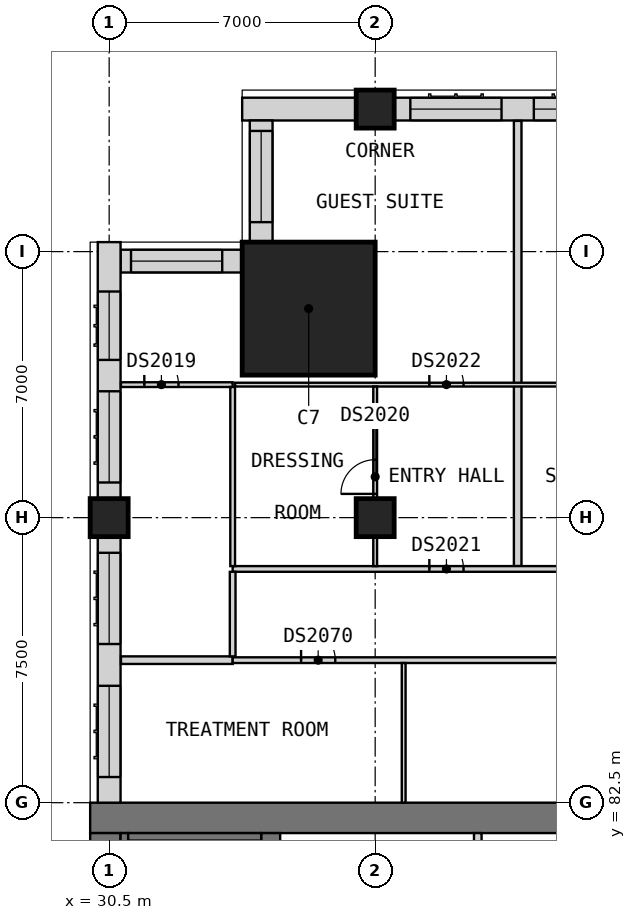
"""IFC4 building model, lengths in metres.
Left out: names, types, materials, properties, quantities, classifications, styles, units other than length and angle.
Written with IfcOpenShell. Run it as: python <this file> out.ifc"""

import sys

from ifc_helpers import new_model, si_unit, direction, frame, frame_2d, origin, origin_2d, place, context, subcontext, project, spatial, rectangle, extrude, element, fill, save


model = new_model("IFC4")
c1 = context("Model", 3, precision=1e-05, world=origin(), true_north=direction((0.0, 1.0)))
c2 = subcontext(c1, "Body", "Model", "MODEL_VIEW")
j1 = project(units=[si_unit("LENGTHUNIT", "METRE"), si_unit("PLANEANGLEUNIT", "RADIAN")], contexts=[c1])
p1 = place(None, origin())
s1 = spatial("IfcSite", under=j1, at=p1, CompositionType="ELEMENT")
p2 = place(p1, origin())
s2 = spatial("IfcBuilding", under=s1, at=p2, CompositionType="ELEMENT")
p3 = place(p2, frame((0.0, 0.0, 162.6)))
s3 = spatial("IfcBuildingStorey", under=s2, at=p3, CompositionType="ELEMENT", Elevation=162.6)
for number, where, z_axis, x_axis in (
    (1, (37.5, 100.75, 0.0), (0.0, 0.0, 1.0), (1.0, 0.0, 0.0)),
    (2, (30.5, 90.0, 0.0), (0.0, 0.0, 1.0), (1.0, 0.0, 0.0)),
    (3, (37.5, 90.0, 0.0), (0.0, 0.0, 1.0), (1.0, 0.0, 0.0)),
):
    element("IfcColumn", number, at=place(p3, frame(where, z_axis=z_axis, x_axis=x_axis)), inside=s3, PredefinedType="COLUMN", context=c2, shape_type="SweptSolid", body=[
        extrude(rectangle(XDim=1.0, YDim=1.0, at=origin_2d()), origin(), (0.0, 0.0, 1.0), 3.6),
    ])
p4 = place(p3, frame((35.75, 95.5, 0.0), z_axis=(0.0, 0.0, 1.0), x_axis=(1.0, 0.0, 0.0)))
e4 = element("IfcColumn", 4, at=p4, inside=s3, PredefinedType="COLUMN", context=c2, shape_type="SweptSolid", body=[
    extrude(rectangle(XDim=3.5, YDim=3.5, at=origin_2d()), origin(), (0.0, 0.0, 1.0), 3.6),
])
p5 = place(p3, frame((30.0, 82.1, 0.0), z_axis=(0.0, 0.0, 1.0), x_axis=(1.0, 0.0, 0.0)))
e5 = element("IfcWall", 5, at=p5, inside=s3, PredefinedType="SHEAR", context=c2, shape_type="SweptSolid", body=[
    extrude(rectangle(XDim=30.0, YDim=0.8, at=frame_2d((15.0, 0.0))), origin(), (0.0, 0.0, 1.0), 3.6),
])
p6 = place(p3, frame((30.4, 60.8, 0.0), z_axis=(0.0, 0.0, 1.0), x_axis=(0.0, 1.0, 0.0)))
e6 = element("IfcWall", 6, at=p6, inside=s3, PredefinedType="SHEAR", context=c2, shape_type="SweptSolid", body=[
    extrude(rectangle(XDim=20.9, YDim=0.8, at=frame_2d((10.45, 0.0))), origin(), (0.0, 0.0, 1.0), 3.6),
])
p7 = place(p3, frame((34.75, 78.3, 0.0), z_axis=(0.0, 0.0, 1.0), x_axis=(0.0, 1.0, 0.0)))
e7 = element("IfcWall", 7, at=p7, inside=s3, PredefinedType="SHEAR", context=c2, shape_type="SweptSolid", body=[
    extrude(rectangle(XDim=3.4, YDim=0.5, at=frame_2d((1.7, 0.0))), origin(), (0.0, 0.0, 1.0), 3.6),
])
p8 = place(p3, frame((44.5, 100.75, 0.0), z_axis=(0.0, 0.0, 1.0), x_axis=(-1.0, 0.0, 0.0)))
e8 = element("IfcWall", 8, at=p8, inside=s3, PredefinedType="SOLIDWALL", context=c2, shape_type="SweptSolid", body=[
    extrude(rectangle(XDim=6.5, YDim=0.6, at=frame_2d((3.25, 0.0))), origin(), (0.0, 0.0, 1.0), 2.85),
])
p9 = place(p8, frame((3.675, 0.0, 0.8)))
e9 = element("IfcOpeningElement", 9, at=p9, cuts=e8, PredefinedType="OPENING", context=c2, shape_type="SweptSolid", body=[
    extrude(rectangle(XDim=2.4, YDim=1.8, at=frame_2d((1.2, 0.9))), frame((0.0, 0.31, 0.0), z_axis=(0.0, -1.0, 0.0), x_axis=(1.0, 0.0, 0.0)), (0.0, 0.0, 1.0), 0.62),
])
p10 = place(p8, frame((0.425, 0.0, 0.8)))
e10 = element("IfcOpeningElement", 10, at=p10, cuts=e8, PredefinedType="OPENING", context=c2, shape_type="SweptSolid", body=[
    extrude(rectangle(XDim=2.4, YDim=1.8, at=frame_2d((1.2, 0.9))), frame((0.0, 0.31, 0.0), z_axis=(0.0, -1.0, 0.0), x_axis=(1.0, 0.0, 0.0)), (0.0, 0.0, 1.0), 0.62),
])
p11 = place(p3, frame((37.0, 100.75, 0.0), z_axis=(0.0, 0.0, 1.0), x_axis=(-1.0, 0.0, 0.0)))
e11 = element("IfcWall", 11, at=p11, inside=s3, PredefinedType="SOLIDWALL", context=c2, shape_type="SweptSolid", body=[
    extrude(rectangle(XDim=3.0, YDim=0.6, at=frame_2d((1.5, 0.0))), origin(), (0.0, 0.0, 1.0), 3.2),
])
p12 = place(p3, frame((34.5, 100.45, 0.0), z_axis=(0.0, 0.0, 1.0), x_axis=(0.0, -1.0, 0.0)))
e12 = element("IfcWall", 12, at=p12, inside=s3, PredefinedType="SOLIDWALL", context=c2, shape_type="SweptSolid", body=[
    extrude(rectangle(XDim=3.2, YDim=0.6, at=frame_2d((1.6, 0.0))), origin(), (0.0, 0.0, 1.0), 3.2),
])
p13 = place(p12, frame((0.275, 0.0, 0.8)))
e13 = element("IfcOpeningElement", 13, at=p13, cuts=e12, PredefinedType="OPENING", context=c2, shape_type="SweptSolid", body=[
    extrude(rectangle(XDim=2.4, YDim=1.8, at=frame_2d((1.2, 0.9))), frame((0.0, 0.31, 0.0), z_axis=(0.0, -1.0, 0.0), x_axis=(1.0, 0.0, 0.0)), (0.0, 0.0, 1.0), 0.62),
])
p14 = place(p3, frame((34.0, 96.75, 0.0), z_axis=(0.0, 0.0, 1.0), x_axis=(-1.0, 0.0, 0.0)))
e14 = element("IfcWall", 14, at=p14, inside=s3, PredefinedType="SOLIDWALL", context=c2, shape_type="SweptSolid", body=[
    extrude(rectangle(XDim=3.2, YDim=0.6, at=frame_2d((1.6, 0.0))), origin(), (0.0, 0.0, 1.0), 3.2),
])
p15 = place(p14, frame((0.525, 0.0, 0.8)))
e15 = element("IfcOpeningElement", 15, at=p15, cuts=e14, PredefinedType="OPENING", context=c2, shape_type="SweptSolid", body=[
    extrude(rectangle(XDim=2.4, YDim=1.8, at=frame_2d((1.2, 0.9))), frame((0.0, 0.31, 0.0), z_axis=(0.0, -1.0, 0.0), x_axis=(1.0, 0.0, 0.0)), (0.0, 0.0, 1.0), 0.62),
])
p16 = place(p3, frame((30.5, 97.25, 0.0), z_axis=(0.0, 0.0, 1.0), x_axis=(0.0, -1.0, 0.0)))
e16 = element("IfcWall", 16, at=p16, inside=s3, PredefinedType="SOLIDWALL", context=c2, shape_type="SweptSolid", body=[
    extrude(rectangle(XDim=6.75, YDim=0.6, at=frame_2d((3.375, 0.0))), origin(), (0.0, 0.0, 1.0), 2.85),
])
p17 = place(p16, frame((3.925, 0.0, 0.8)))
e17 = element("IfcOpeningElement", 17, at=p17, cuts=e16, PredefinedType="OPENING", context=c2, shape_type="SweptSolid", body=[
    extrude(rectangle(XDim=2.4, YDim=1.8, at=frame_2d((1.2, 0.9))), frame((0.0, 0.31, 0.0), z_axis=(0.0, -1.0, 0.0), x_axis=(1.0, 0.0, 0.0)), (0.0, 0.0, 1.0), 0.62),
])
p18 = place(p16, frame((1.3, 0.0, 0.8)))
e18 = element("IfcOpeningElement", 18, at=p18, cuts=e16, PredefinedType="OPENING", context=c2, shape_type="SweptSolid", body=[
    extrude(rectangle(XDim=1.8, YDim=1.8, at=frame_2d((0.9, 0.9))), frame((0.0, 0.31, 0.0), z_axis=(0.0, -1.0, 0.0), x_axis=(1.0, 0.0, 0.0)), (0.0, 0.0, 1.0), 0.62),
])
p19 = place(p3, frame((30.5, 89.5, 0.0), z_axis=(0.0, 0.0, 1.0), x_axis=(0.0, -1.0, 0.0)))
e19 = element("IfcWall", 19, at=p19, inside=s3, PredefinedType="SOLIDWALL", context=c2, shape_type="SweptSolid", body=[
    extrude(rectangle(XDim=7.0, YDim=0.6, at=frame_2d((3.5, 0.0))), origin(), (0.0, 0.0, 1.0), 3.2),
])
p20 = place(p19, frame((3.925, 0.0, 0.8)))
e20 = element("IfcOpeningElement", 20, at=p20, cuts=e19, PredefinedType="OPENING", context=c2, shape_type="SweptSolid", body=[
    extrude(rectangle(XDim=2.4, YDim=1.8, at=frame_2d((1.2, 0.9))), frame((0.0, 0.31, 0.0), z_axis=(0.0, -1.0, 0.0), x_axis=(1.0, 0.0, 0.0)), (0.0, 0.0, 1.0), 0.62),
])
p21 = place(p19, frame((0.425, 0.0, 0.8)))
e21 = element("IfcOpeningElement", 21, at=p21, cuts=e19, PredefinedType="OPENING", context=c2, shape_type="SweptSolid", body=[
    extrude(rectangle(XDim=2.4, YDim=1.8, at=frame_2d((1.2, 0.9))), frame((0.0, 0.31, 0.0), z_axis=(0.0, -1.0, 0.0), x_axis=(1.0, 0.0, 0.0)), (0.0, 0.0, 1.0), 0.62),
])
p22 = place(p3, frame((40.2, 78.5, 0.0), z_axis=(0.0, 0.0, 1.0), x_axis=(0.0, 1.0, 0.0)))
e22 = element("IfcWall", 22, at=p22, inside=s3, PredefinedType="SOLIDWALL", context=c2, shape_type="SweptSolid", body=[
    extrude(rectangle(XDim=3.2, YDim=0.2, at=frame_2d((1.6, 0.0))), origin(), (0.0, 0.0, 1.0), 3.6),
])
p23 = place(p3, frame((30.9, 60.8, 0.0), z_axis=(0.0, 0.0, 1.0), x_axis=(0.0, 1.0, 0.0)))
e23 = element("IfcWall", 23, at=p23, inside=s3, PredefinedType="SOLIDWALL", context=c2, shape_type="SweptSolid", body=[
    extrude(rectangle(XDim=20.9, YDim=0.2, at=frame_2d((10.45, 0.0))), origin(), (0.0, 0.0, 1.0), 3.19),
])
p24 = place(p3, frame((31.0, 81.6, 0.0), z_axis=(0.0, 0.0, 1.0), x_axis=(1.0, 0.0, 0.0)))
e24 = element("IfcWall", 24, at=p24, inside=s3, PredefinedType="SOLIDWALL", context=c2, shape_type="SweptSolid", body=[
    extrude(rectangle(XDim=3.5, YDim=0.2, at=frame_2d((1.75, 0.0))), origin(), (0.0, 0.0, 1.0), 3.19),
])
p25 = place(p3, frame((30.81, 86.25, 0.0), z_axis=(0.0, 0.0, 1.0), x_axis=(1.0, 0.0, 0.0)))
e25 = element("IfcWall", 25, at=p25, inside=s3, PredefinedType="PARTITIONING", context=c2, shape_type="SweptSolid", body=[
    extrude(rectangle(XDim=2.94, YDim=0.2, at=frame_2d((1.47, 0.0))), origin(), (0.0, 0.0, 1.0), 3.2),
])
p26 = place(p3, frame((41.25, 88.725, 0.0), z_axis=(0.0, 0.0, 1.0), x_axis=(0.0, 1.0, 0.0)))
e26 = element("IfcWall", 26, at=p26, inside=s3, PredefinedType="PARTITIONING", context=c2, shape_type="SweptSolid", body=[
    extrude(rectangle(XDim=11.715, YDim=0.2, at=frame_2d((5.857, 0.0))), origin(), (0.0, 0.0, 1.0), 3.2),
])
p27 = place(p3, frame((33.75, 86.25, 0.0), z_axis=(0.0, 0.0, 1.0), x_axis=(1.0, 0.0, 0.0)))
e27 = element("IfcWall", 27, at=p27, inside=s3, PredefinedType="PARTITIONING", context=c2, shape_type="SweptSolid", body=[
    extrude(rectangle(XDim=37.5, YDim=0.15, at=frame_2d((18.75, 0.0))), origin(), (0.0, 0.0, 1.0), 3.2),
])
p28 = place(p27, frame((1.8, 0.0, 0.0)))
e28 = element("IfcOpeningElement", 28, at=p28, cuts=e27, PredefinedType="OPENING", context=c2, shape_type="SweptSolid", body=[
    extrude(rectangle(XDim=0.9, YDim=2.1, at=frame_2d((0.45, 1.05))), frame((0.0, 0.085, 0.0), z_axis=(0.0, -1.0, 0.0), x_axis=(1.0, 0.0, 0.0)), (0.0, 0.0, 1.0), 0.17),
])
p29 = place(p3, frame((33.75, 88.65, 0.0), z_axis=(0.0, 0.0, 1.0), x_axis=(1.0, 0.0, 0.0)))
e29 = element("IfcWall", 29, at=p29, inside=s3, PredefinedType="PARTITIONING", context=c2, shape_type="SweptSolid", body=[
    extrude(rectangle(XDim=39.9, YDim=0.15, at=frame_2d((19.95, 0.0))), origin(), (0.0, 0.0, 1.0), 3.2),
])
p30 = place(p29, frame((5.175, 0.0, 0.0)))
e30 = element("IfcOpeningElement", 30, at=p30, cuts=e29, PredefinedType="OPENING", context=c2, shape_type="SweptSolid", body=[
    extrude(rectangle(XDim=0.9, YDim=2.1, at=frame_2d((0.45, 1.05))), frame((0.0, 0.085, 0.0), z_axis=(0.0, -1.0, 0.0), x_axis=(1.0, 0.0, 0.0)), (0.0, 0.0, 1.0), 0.17),
])
p31 = place(p29, frame((9.3, 0.0, 0.0)))
e31 = element("IfcOpeningElement", 31, at=p31, cuts=e29, PredefinedType="OPENING", context=c2, shape_type="SweptSolid", body=[
    extrude(rectangle(XDim=0.9, YDim=2.1, at=frame_2d((0.45, 1.05))), frame((0.0, 0.085, 0.0), z_axis=(0.0, -1.0, 0.0), x_axis=(1.0, 0.0, 0.0)), (0.0, 0.0, 1.0), 0.17),
])
p32 = place(p29, frame((21.113, 0.0, 0.0)))
e32 = element("IfcOpeningElement", 32, at=p32, cuts=e29, PredefinedType="OPENING", context=c2, shape_type="SweptSolid", body=[
    extrude(rectangle(XDim=0.9, YDim=2.1, at=frame_2d((0.45, 1.05))), frame((0.0, 0.085, 0.0), z_axis=(0.0, -1.0, 0.0), x_axis=(1.0, 0.0, 0.0)), (0.0, 0.0, 1.0), 0.17),
])
p33 = place(p29, frame((28.05, 0.0, 0.0)))
e33 = element("IfcOpeningElement", 33, at=p33, cuts=e29, PredefinedType="OPENING", context=c2, shape_type="SweptSolid", body=[
    extrude(rectangle(XDim=0.9, YDim=2.1, at=frame_2d((0.45, 1.05))), frame((0.0, 0.085, 0.0), z_axis=(0.0, -1.0, 0.0), x_axis=(1.0, 0.0, 0.0)), (0.0, 0.0, 1.0), 0.17),
])
p34 = place(p29, frame((35.55, 0.0, 0.0)))
e34 = element("IfcOpeningElement", 34, at=p34, cuts=e29, PredefinedType="OPENING", context=c2, shape_type="SweptSolid", body=[
    extrude(rectangle(XDim=0.9, YDim=2.1, at=frame_2d((0.45, 1.05))), frame((0.0, 0.085, 0.0), z_axis=(0.0, -1.0, 0.0), x_axis=(1.0, 0.0, 0.0)), (0.0, 0.0, 1.0), 0.17),
])
p35 = place(p29, frame((38.25, 0.0, 0.0)))
e35 = element("IfcOpeningElement", 35, at=p35, cuts=e29, PredefinedType="OPENING", context=c2, shape_type="SweptSolid", body=[
    extrude(rectangle(XDim=0.9, YDim=2.1, at=frame_2d((0.45, 1.05))), frame((0.0, 0.085, 0.0), z_axis=(0.0, -1.0, 0.0), x_axis=(1.0, 0.0, 0.0)), (0.0, 0.0, 1.0), 0.17),
])
p36 = place(p3, frame((33.75, 86.35, 0.0), z_axis=(0.0, 0.0, 1.0), x_axis=(0.0, 1.0, 0.0)))
e36 = element("IfcWall", 36, at=p36, inside=s3, PredefinedType="PARTITIONING", context=c2, shape_type="SweptSolid", body=[
    extrude(rectangle(XDim=2.225, YDim=0.15, at=frame_2d((1.112, 0.0))), origin(), (0.0, 0.0, 1.0), 3.2),
])
p37 = place(p3, frame((33.812, 93.5, 0.0), z_axis=(0.0, 0.0, 1.0), x_axis=(1.0, 0.0, 0.0)))
e37 = element("IfcWall", 37, at=p37, inside=s3, PredefinedType="PARTITIONING", context=c2, shape_type="SweptSolid", body=[
    extrude(rectangle(XDim=11.875, YDim=0.1, at=frame_2d((5.938, 0.0))), origin(), (0.0, 0.0, 1.0), 3.2),
])
p38 = place(p37, frame((5.113, 0.0, 0.0)))
e38 = element("IfcOpeningElement", 38, at=p38, cuts=e37, PredefinedType="OPENING", context=c2, shape_type="SweptSolid", body=[
    extrude(rectangle(XDim=0.9, YDim=2.1, at=frame_2d((0.45, 1.05))), frame((0.0, 0.06, 0.0), z_axis=(0.0, -1.0, 0.0), x_axis=(1.0, 0.0, 0.0)), (0.0, 0.0, 1.0), 0.12),
])
p39 = place(p37, frame((9.238, 0.0, 0.0)))
e39 = element("IfcOpeningElement", 39, at=p39, cuts=e37, PredefinedType="OPENING", context=c2, shape_type="SweptSolid", body=[
    extrude(rectangle(XDim=0.9, YDim=2.1, at=frame_2d((0.45, 1.05))), frame((0.0, 0.06, 0.0), z_axis=(0.0, -1.0, 0.0), x_axis=(1.0, 0.0, 0.0)), (0.0, 0.0, 1.0), 0.12),
])
p40 = place(p3, frame((37.5, 88.725, 0.0), z_axis=(0.0, 0.0, 1.0), x_axis=(0.0, 1.0, 0.0)))
e40 = element("IfcWall", 40, at=p40, inside=s3, PredefinedType="PARTITIONING", context=c2, shape_type="SweptSolid", body=[
    extrude(rectangle(XDim=4.725, YDim=0.1, at=frame_2d((2.362, 0.0))), origin(), (0.0, 0.0, 1.0), 3.2),
])
p41 = place(p40, frame((1.9, 0.0, 0.0)))
e41 = element("IfcOpeningElement", 41, at=p41, cuts=e40, PredefinedType="OPENING", context=c2, shape_type="SweptSolid", body=[
    extrude(rectangle(XDim=0.9, YDim=2.1, at=frame_2d((0.45, 1.05))), frame((0.0, 0.06, 0.0), z_axis=(0.0, -1.0, 0.0), x_axis=(1.0, 0.0, 0.0)), (0.0, 0.0, 1.0), 0.12),
])
p42 = place(p3, frame((38.25, 82.5, 0.0), z_axis=(0.0, 0.0, 1.0), x_axis=(0.0, 1.0, 0.0)))
e42 = element("IfcWall", 42, at=p42, inside=s3, PredefinedType="PARTITIONING", context=c2, shape_type="SweptSolid", body=[
    extrude(rectangle(XDim=3.675, YDim=0.1, at=frame_2d((1.837, 0.0))), origin(), (0.0, 0.0, 1.0), 3.2),
])
p43 = place(p3, frame((30.81, 93.5, 0.0), z_axis=(0.0, 0.0, 1.0), x_axis=(1.0, 0.0, 0.0)))
e43 = element("IfcWall", 43, at=p43, inside=s3, PredefinedType="PARTITIONING", context=c2, shape_type="SweptSolid", body=[
    extrude(rectangle(XDim=2.94, YDim=0.125, at=frame_2d((1.47, 0.0))), origin(), (0.0, 0.0, 1.0), 3.2),
])
p44 = place(p43, frame((0.615, 0.0, 0.0)))
e44 = element("IfcOpeningElement", 44, at=p44, cuts=e43, PredefinedType="OPENING", context=c2, shape_type="SweptSolid", body=[
    extrude(rectangle(XDim=0.9, YDim=2.1, at=frame_2d((0.45, 1.05))), frame((0.0, 0.073, 0.0), z_axis=(0.0, -1.0, 0.0), x_axis=(1.0, 0.0, 0.0)), (0.0, 0.0, 1.0), 0.145),
])
p45 = place(p3, frame((33.75, 88.725, 0.0), z_axis=(0.0, 0.0, 1.0), x_axis=(0.0, 1.0, 0.0)))
e45 = element("IfcWall", 45, at=p45, inside=s3, PredefinedType="PARTITIONING", context=c2, shape_type="SweptSolid", body=[
    extrude(rectangle(XDim=4.712, YDim=0.125, at=frame_2d((2.356, 0.0))), origin(), (0.0, 0.0, 1.0), 3.2),
])
p46 = place(p9, origin())
e46 = element("IfcWindow", 46, at=p46, inside=s3, PartitioningType="SINGLE_PANEL", PredefinedType="WINDOW", context=c2, shape_type="SweptSolid", body=[
    extrude(rectangle(XDim=2.4, YDim=1.8, at=frame_2d((1.2, 0.9))), frame((0.0, -0.07, 0.0), z_axis=(0.0, -1.0, 0.0), x_axis=(1.0, 0.0, 0.0)), (0.0, 0.0, 1.0), 0.06),
])
fill(e9, e46)
p47 = place(p10, origin())
e47 = element("IfcWindow", 47, at=p47, inside=s3, PartitioningType="SINGLE_PANEL", PredefinedType="WINDOW", context=c2, shape_type="SweptSolid", body=[
    extrude(rectangle(XDim=2.4, YDim=1.8, at=frame_2d((1.2, 0.9))), frame((0.0, -0.07, 0.0), z_axis=(0.0, -1.0, 0.0), x_axis=(1.0, 0.0, 0.0)), (0.0, 0.0, 1.0), 0.06),
])
fill(e10, e47)
p48 = place(p13, origin())
e48 = element("IfcWindow", 48, at=p48, inside=s3, PartitioningType="SINGLE_PANEL", PredefinedType="WINDOW", context=c2, shape_type="SweptSolid", body=[
    extrude(rectangle(XDim=2.4, YDim=1.8, at=frame_2d((1.2, 0.9))), frame((0.0, -0.07, 0.0), z_axis=(0.0, -1.0, 0.0), x_axis=(1.0, 0.0, 0.0)), (0.0, 0.0, 1.0), 0.06),
])
fill(e13, e48)
p49 = place(p15, origin())
e49 = element("IfcWindow", 49, at=p49, inside=s3, PartitioningType="SINGLE_PANEL", PredefinedType="WINDOW", context=c2, shape_type="SweptSolid", body=[
    extrude(rectangle(XDim=2.4, YDim=1.8, at=frame_2d((1.2, 0.9))), frame((0.0, -0.07, 0.0), z_axis=(0.0, -1.0, 0.0), x_axis=(1.0, 0.0, 0.0)), (0.0, 0.0, 1.0), 0.06),
])
fill(e15, e49)
p50 = place(p17, origin())
e50 = element("IfcWindow", 50, at=p50, inside=s3, PartitioningType="SINGLE_PANEL", PredefinedType="WINDOW", context=c2, shape_type="SweptSolid", body=[
    extrude(rectangle(XDim=2.4, YDim=1.8, at=frame_2d((1.2, 0.9))), frame((0.0, -0.07, 0.0), z_axis=(0.0, -1.0, 0.0), x_axis=(1.0, 0.0, 0.0)), (0.0, 0.0, 1.0), 0.06),
])
fill(e17, e50)
p51 = place(p18, origin())
e51 = element("IfcWindow", 51, at=p51, inside=s3, PartitioningType="SINGLE_PANEL", PredefinedType="WINDOW", context=c2, shape_type="SweptSolid", body=[
    extrude(rectangle(XDim=1.8, YDim=1.8, at=frame_2d((0.9, 0.9))), frame((0.0, -0.07, 0.0), z_axis=(0.0, -1.0, 0.0), x_axis=(1.0, 0.0, 0.0)), (0.0, 0.0, 1.0), 0.06),
])
fill(e18, e51)
p52 = place(p20, origin())
e52 = element("IfcWindow", 52, at=p52, inside=s3, PartitioningType="SINGLE_PANEL", PredefinedType="WINDOW", context=c2, shape_type="SweptSolid", body=[
    extrude(rectangle(XDim=2.4, YDim=1.8, at=frame_2d((1.2, 0.9))), frame((0.0, -0.07, 0.0), z_axis=(0.0, -1.0, 0.0), x_axis=(1.0, 0.0, 0.0)), (0.0, 0.0, 1.0), 0.06),
])
fill(e20, e52)
p53 = place(p21, origin())
e53 = element("IfcWindow", 53, at=p53, inside=s3, PartitioningType="SINGLE_PANEL", PredefinedType="WINDOW", context=c2, shape_type="SweptSolid", body=[
    extrude(rectangle(XDim=2.4, YDim=1.8, at=frame_2d((1.2, 0.9))), frame((0.0, -0.07, 0.0), z_axis=(0.0, -1.0, 0.0), x_axis=(1.0, 0.0, 0.0)), (0.0, 0.0, 1.0), 0.06),
])
fill(e21, e53)
p54 = place(p44, origin())
e54 = element("IfcDoor", 54, at=p54, inside=s3, OperationType="SINGLE_SWING_RIGHT", PredefinedType="DOOR", context=c2, shape_type="SweptSolid", body=[
    extrude(rectangle(XDim=0.9, YDim=2.1, at=frame_2d((0.45, 1.05))), frame((0.0, 0.025, 0.0), z_axis=(0.0, -1.0, 0.0), x_axis=(1.0, 0.0, 0.0)), (0.0, 0.0, 1.0), 0.05),
])
fill(e44, e54)
p55 = place(p41, origin())
e55 = element("IfcDoor", 55, at=p55, inside=s3, OperationType="SINGLE_SWING_RIGHT", PredefinedType="DOOR", context=c2, shape_type="SweptSolid", body=[
    extrude(rectangle(XDim=0.9, YDim=2.1, at=frame_2d((0.45, 1.05))), frame((0.0, 0.025, 0.0), z_axis=(0.0, -1.0, 0.0), x_axis=(1.0, 0.0, 0.0)), (0.0, 0.0, 1.0), 0.05),
])
fill(e41, e55)
p56 = place(p30, origin())
e56 = element("IfcDoor", 56, at=p56, inside=s3, OperationType="SINGLE_SWING_LEFT", PredefinedType="DOOR", context=c2, shape_type="SweptSolid", body=[
    extrude(rectangle(XDim=0.9, YDim=2.1, at=frame_2d((0.45, 1.05))), frame((0.0, 0.025, 0.0), z_axis=(0.0, -1.0, 0.0), x_axis=(1.0, 0.0, 0.0)), (0.0, 0.0, 1.0), 0.05),
])
fill(e30, e56)
p57 = place(p38, origin())
e57 = element("IfcDoor", 57, at=p57, inside=s3, OperationType="SINGLE_SWING_RIGHT", PredefinedType="DOOR", context=c2, shape_type="SweptSolid", body=[
    extrude(rectangle(XDim=0.9, YDim=2.1, at=frame_2d((0.45, 1.05))), frame((0.0, 0.025, 0.0), z_axis=(0.0, -1.0, 0.0), x_axis=(1.0, 0.0, 0.0)), (0.0, 0.0, 1.0), 0.05),
])
fill(e38, e57)
p58 = place(p28, origin())
e58 = element("IfcDoor", 58, at=p58, inside=s3, OperationType="SINGLE_SWING_RIGHT", PredefinedType="DOOR", context=c2, shape_type="SweptSolid", body=[
    extrude(rectangle(XDim=0.9, YDim=2.1, at=frame_2d((0.45, 1.05))), frame((0.0, 0.025, 0.0), z_axis=(0.0, -1.0, 0.0), x_axis=(1.0, 0.0, 0.0)), (0.0, 0.0, 1.0), 0.05),
])
fill(e28, e58)
save(model, sys.argv[1])
